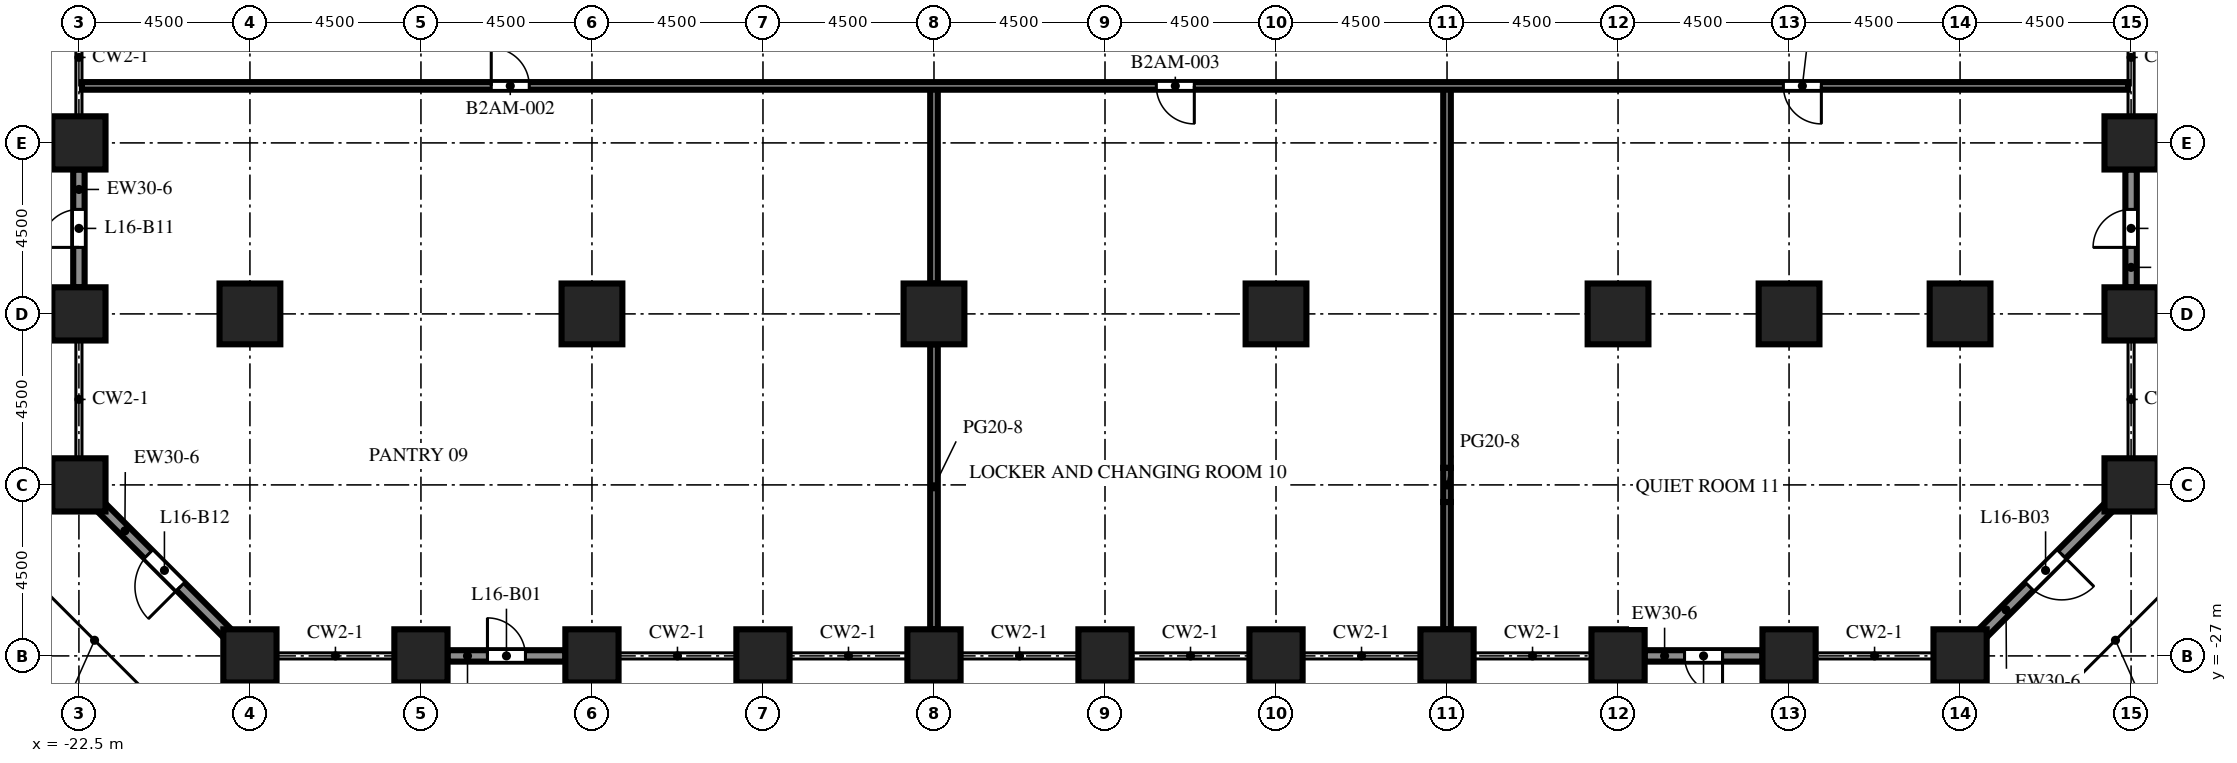
"""IFC4 building model, lengths in metres.
Left out: names, types, materials, properties, quantities, classifications, styles, units other than length and angle.
Written with IfcOpenShell. Run it as: python <this file> out.ifc"""

import sys

from ifc_helpers import new_model, si_unit, direction, frame, frame_2d, origin, origin_2d, place, context, subcontext, project, spatial, rectangle, extrude, element, fill, save


model = new_model("IFC4")
c1 = context("Model", 3, precision=1e-05, world=origin(), true_north=direction((0.0, 1.0)))
c2 = subcontext(c1, "Body", "Model", "MODEL_VIEW")
j1 = project(units=[si_unit("LENGTHUNIT", "METRE"), si_unit("PLANEANGLEUNIT", "RADIAN")], contexts=[c1])
p1 = place(None, origin())
s1 = spatial("IfcSite", under=j1, at=p1, CompositionType="ELEMENT")
p2 = place(p1, origin())
s2 = spatial("IfcBuilding", under=s1, at=p2, CompositionType="ELEMENT")
p3 = place(p2, frame((0.0, 0.0, 70.6)))
s3 = spatial("IfcBuildingStorey", under=s2, at=p3, CompositionType="ELEMENT", Elevation=70.6)
p4 = place(p3, frame((-22.5, -22.5, 0.0), z_axis=(0.0, 0.0, 1.0), x_axis=(1.0, 0.0, 0.0)))
e1 = element("IfcColumn", 1, at=p4, inside=s3, PredefinedType="COLUMN", context=c2, shape_type="SweptSolid", body=[
    extrude(rectangle(XDim=1.4, YDim=1.4, at=origin_2d()), origin(), (0.0, 0.0, 1.0), 3.6),
])
for number, where, z_axis, x_axis in (
    (2, (-22.5, -18.0, 0.0), (0.0, 0.0, 1.0), (1.0, 0.0, 0.0)),
    (3, (-22.5, -13.5, 0.0), (0.0, 0.0, 1.0), (1.0, 0.0, 0.0)),
    (4, (-18.0, -27.0, 0.0), (0.0, 0.0, 1.0), (1.0, 0.0, 0.0)),
    (5, (-13.5, -27.0, 0.0), (0.0, 0.0, 1.0), (1.0, 0.0, 0.0)),
):
    element("IfcColumn", number, at=place(p3, frame(where, z_axis=z_axis, x_axis=x_axis)), inside=s3, PredefinedType="COLUMN", context=c2, shape_type="SweptSolid", body=[
        extrude(rectangle(XDim=1.4, YDim=1.4, at=origin_2d()), origin(), (0.0, 0.0, 1.0), 6.0),
    ])
p5 = place(p3, frame((-9.0, -27.0, 0.0), z_axis=(0.0, 0.0, 1.0), x_axis=(1.0, 0.0, 0.0)))
e6 = element("IfcColumn", 6, at=p5, inside=s3, PredefinedType="COLUMN", context=c2, shape_type="SweptSolid", body=[
    extrude(rectangle(XDim=1.4, YDim=1.4, at=origin_2d()), origin(), (0.0, 0.0, 1.0), 3.6),
])
p6 = place(p3, frame((-4.5, -27.0, 0.0), z_axis=(0.0, 0.0, 1.0), x_axis=(1.0, 0.0, 0.0)))
e7 = element("IfcColumn", 7, at=p6, inside=s3, PredefinedType="COLUMN", context=c2, shape_type="SweptSolid", body=[
    extrude(rectangle(XDim=1.4, YDim=1.4, at=origin_2d()), origin(), (0.0, 0.0, 1.0), 6.0),
])
p7 = place(p3, frame((0.0, -27.0, 0.0), z_axis=(0.0, 0.0, 1.0), x_axis=(1.0, 0.0, 0.0)))
e8 = element("IfcColumn", 8, at=p7, inside=s3, PredefinedType="COLUMN", context=c2, shape_type="SweptSolid", body=[
    extrude(rectangle(XDim=1.4, YDim=1.4, at=origin_2d()), origin(), (0.0, 0.0, 1.0), 3.6),
])
p8 = place(p3, frame((4.5, -27.0, 0.0), z_axis=(0.0, 0.0, 1.0), x_axis=(1.0, 0.0, 0.0)))
e9 = element("IfcColumn", 9, at=p8, inside=s3, PredefinedType="COLUMN", context=c2, shape_type="SweptSolid", body=[
    extrude(rectangle(XDim=1.4, YDim=1.4, at=origin_2d()), origin(), (0.0, 0.0, 1.0), 6.0),
])
p9 = place(p3, frame((9.0, -27.0, 0.0), z_axis=(0.0, 0.0, 1.0), x_axis=(1.0, 0.0, 0.0)))
e10 = element("IfcColumn", 10, at=p9, inside=s3, PredefinedType="COLUMN", context=c2, shape_type="SweptSolid", body=[
    extrude(rectangle(XDim=1.4, YDim=1.4, at=origin_2d()), origin(), (0.0, 0.0, 1.0), 3.6),
])
for number, where, z_axis, x_axis in (
    (11, (13.5, -27.0, 0.0), (0.0, 0.0, 1.0), (1.0, 0.0, 0.0)),
    (12, (18.0, -27.0, 0.0), (0.0, 0.0, 1.0), (1.0, 0.0, 0.0)),
):
    element("IfcColumn", number, at=place(p3, frame(where, z_axis=z_axis, x_axis=x_axis)), inside=s3, PredefinedType="COLUMN", context=c2, shape_type="SweptSolid", body=[
        extrude(rectangle(XDim=1.4, YDim=1.4, at=origin_2d()), origin(), (0.0, 0.0, 1.0), 6.0),
    ])
p10 = place(p3, frame((22.5, -27.0, 0.0), z_axis=(0.0, 0.0, 1.0), x_axis=(1.0, 0.0, 0.0)))
e13 = element("IfcColumn", 13, at=p10, inside=s3, PredefinedType="COLUMN", context=c2, shape_type="SweptSolid", body=[
    extrude(rectangle(XDim=1.4, YDim=1.4, at=origin_2d()), origin(), (0.0, 0.0, 1.0), 3.6),
])
p11 = place(p3, frame((27.0, -27.0, 0.0), z_axis=(0.0, 0.0, 1.0), x_axis=(1.0, 0.0, 0.0)))
e14 = element("IfcColumn", 14, at=p11, inside=s3, PredefinedType="COLUMN", context=c2, shape_type="SweptSolid", body=[
    extrude(rectangle(XDim=1.4, YDim=1.4, at=origin_2d()), origin(), (0.0, 0.0, 1.0), 6.0),
])
p12 = place(p3, frame((31.5, -22.5, 0.0), z_axis=(0.0, 0.0, 1.0), x_axis=(1.0, 0.0, 0.0)))
e15 = element("IfcColumn", 15, at=p12, inside=s3, PredefinedType="COLUMN", context=c2, shape_type="SweptSolid", body=[
    extrude(rectangle(XDim=1.4, YDim=1.4, at=origin_2d()), origin(), (0.0, 0.0, 1.0), 3.6),
])
for number, where, z_axis, x_axis in (
    (16, (31.5, -18.0, 0.0), (0.0, 0.0, 1.0), (1.0, 0.0, 0.0)),
    (17, (31.5, -13.5, 0.0), (0.0, 0.0, 1.0), (1.0, 0.0, 0.0)),
):
    element("IfcColumn", number, at=place(p3, frame(where, z_axis=z_axis, x_axis=x_axis)), inside=s3, PredefinedType="COLUMN", context=c2, shape_type="SweptSolid", body=[
        extrude(rectangle(XDim=1.4, YDim=1.4, at=origin_2d()), origin(), (0.0, 0.0, 1.0), 6.0),
    ])
p13 = place(p3, frame((-18.0, -18.0, 0.0), z_axis=(0.0, 0.0, 1.0), x_axis=(1.0, 0.0, 0.0)))
e18 = element("IfcColumn", 18, at=p13, inside=s3, PredefinedType="COLUMN", context=c2, shape_type="SweptSolid", body=[
    extrude(rectangle(XDim=1.6, YDim=1.6, at=origin_2d()), origin(), (0.0, 0.0, 1.0), 6.0),
])
for number, where, z_axis, x_axis in (
    (19, (-9.0, -18.0, 0.0), (0.0, 0.0, 1.0), (1.0, 0.0, 0.0)),
    (20, (0.0, -18.0, 0.0), (0.0, 0.0, 1.0), (1.0, 0.0, 0.0)),
    (21, (9.0, -18.0, 0.0), (0.0, 0.0, 1.0), (1.0, 0.0, 0.0)),
):
    element("IfcColumn", number, at=place(p3, frame(where, z_axis=z_axis, x_axis=x_axis)), inside=s3, PredefinedType="COLUMN", context=c2, shape_type="SweptSolid", body=[
        extrude(rectangle(XDim=1.6, YDim=1.6, at=origin_2d()), origin(), (0.0, 0.0, 1.0), 5.4),
    ])
p14 = place(p3, frame((18.0, -18.0, 0.0), z_axis=(0.0, 0.0, 1.0), x_axis=(1.0, 0.0, 0.0)))
e22 = element("IfcColumn", 22, at=p14, inside=s3, PredefinedType="COLUMN", context=c2, shape_type="SweptSolid", body=[
    extrude(rectangle(XDim=1.6, YDim=1.6, at=origin_2d()), origin(), (0.0, 0.0, 1.0), 6.0),
])
p15 = place(p3, frame((22.5, -18.0, 0.0), z_axis=(0.0, 0.0, 1.0), x_axis=(1.0, 0.0, 0.0)))
e23 = element("IfcColumn", 23, at=p15, inside=s3, PredefinedType="COLUMN", context=c2, shape_type="SweptSolid", body=[
    extrude(rectangle(XDim=1.6, YDim=1.6, at=origin_2d()), origin(), (0.0, 0.0, 1.0), 5.4),
])
p16 = place(p3, frame((27.0, -18.0, 0.0), z_axis=(0.0, 0.0, 1.0), x_axis=(1.0, 0.0, 0.0)))
e24 = element("IfcColumn", 24, at=p16, inside=s3, PredefinedType="COLUMN", context=c2, shape_type="SweptSolid", body=[
    extrude(rectangle(XDim=1.6, YDim=1.6, at=origin_2d()), origin(), (0.0, 0.0, 1.0), 6.0),
])
p17 = place(p3, frame((-9.7, -27.0, 0.0), z_axis=(0.0, 0.0, 1.0), x_axis=(-1.0, 0.0, 0.0)))
e25 = element("IfcWall", 25, at=p17, inside=s3, PredefinedType="SOLIDWALL", context=c2, shape_type="SweptSolid", body=[
    extrude(rectangle(XDim=3.1, YDim=0.3, at=frame_2d((1.55, 0.0))), origin(), (0.0, 0.0, 1.0), 4.5),
])
p18 = place(p17, frame((1.05, 0.0, 0.0)))
e26 = element("IfcOpeningElement", 26, at=p18, cuts=e25, PredefinedType="OPENING", context=c2, shape_type="SweptSolid", body=[
    extrude(rectangle(XDim=1.0, YDim=2.2, at=frame_2d((0.5, 1.1))), frame((0.0, 0.16, 0.0), z_axis=(0.0, -1.0, 0.0), x_axis=(1.0, 0.0, 0.0)), (0.0, 0.0, 1.0), 0.32),
])
p19 = place(p3, frame((21.8, -27.0, 0.0), z_axis=(0.0, 0.0, 1.0), x_axis=(-1.0, 0.0, 0.0)))
e27 = element("IfcWall", 27, at=p19, inside=s3, PredefinedType="SOLIDWALL", context=c2, shape_type="SweptSolid", body=[
    extrude(rectangle(XDim=3.1, YDim=0.3, at=frame_2d((1.55, 0.0))), origin(), (0.0, 0.0, 1.0), 4.5),
])
p20 = place(p19, frame((1.05, 0.0, 0.0)))
e28 = element("IfcOpeningElement", 28, at=p20, cuts=e27, PredefinedType="OPENING", context=c2, shape_type="SweptSolid", body=[
    extrude(rectangle(XDim=1.0, YDim=2.2, at=frame_2d((0.5, 1.1))), frame((0.0, 0.16, 0.0), z_axis=(0.0, -1.0, 0.0), x_axis=(1.0, 0.0, 0.0)), (0.0, 0.0, 1.0), 0.32),
])
p21 = place(p3, frame((30.906, -23.094, 0.0), z_axis=(0.0, 0.0, 1.0), x_axis=(-0.707106781187, -0.707106781187, 0.0)))
e29 = element("IfcWall", 29, at=p21, inside=s3, PredefinedType="SOLIDWALL", context=c2, shape_type="SweptSolid", body=[
    extrude(rectangle(XDim=4.684, YDim=0.3, at=frame_2d((2.342, 0.0))), origin(), (0.0, 0.0, 1.0), 4.5),
])
p22 = place(p21, frame((1.742, 0.0, 0.0)))
e30 = element("IfcOpeningElement", 30, at=p22, cuts=e29, PredefinedType="OPENING", context=c2, shape_type="SweptSolid", body=[
    extrude(rectangle(XDim=1.2, YDim=2.2, at=frame_2d((0.6, 1.1))), frame((0.0, 0.16, 0.0), z_axis=(0.0, -1.0, 0.0), x_axis=(1.0, 0.0, 0.0)), (0.0, 0.0, 1.0), 0.32),
])
p23 = place(p3, frame((31.5, -14.2, 0.0), z_axis=(0.0, 0.0, 1.0), x_axis=(0.0, -1.0, 0.0)))
e31 = element("IfcWall", 31, at=p23, inside=s3, PredefinedType="SOLIDWALL", context=c2, shape_type="SweptSolid", body=[
    extrude(rectangle(XDim=3.1, YDim=0.3, at=frame_2d((1.55, 0.0))), origin(), (0.0, 0.0, 1.0), 4.5),
])
p24 = place(p23, frame((1.05, 0.0, 0.0)))
e32 = element("IfcOpeningElement", 32, at=p24, cuts=e31, PredefinedType="OPENING", context=c2, shape_type="SweptSolid", body=[
    extrude(rectangle(XDim=1.0, YDim=2.2, at=frame_2d((0.5, 1.1))), frame((0.0, 0.16, 0.0), z_axis=(0.0, -1.0, 0.0), x_axis=(1.0, 0.0, 0.0)), (0.0, 0.0, 1.0), 0.32),
])
p25 = place(p3, frame((-22.5, -17.3, 0.0), z_axis=(0.0, 0.0, 1.0), x_axis=(0.0, 1.0, 0.0)))
e33 = element("IfcWall", 33, at=p25, inside=s3, PredefinedType="SOLIDWALL", context=c2, shape_type="SweptSolid", body=[
    extrude(rectangle(XDim=3.1, YDim=0.3, at=frame_2d((1.55, 0.0))), origin(), (0.0, 0.0, 1.0), 4.5),
])
p26 = place(p25, frame((1.05, 0.0, 0.0)))
e34 = element("IfcOpeningElement", 34, at=p26, cuts=e33, PredefinedType="OPENING", context=c2, shape_type="SweptSolid", body=[
    extrude(rectangle(XDim=1.0, YDim=2.2, at=frame_2d((0.5, 1.1))), frame((0.0, 0.16, 0.0), z_axis=(0.0, -1.0, 0.0), x_axis=(1.0, 0.0, 0.0)), (0.0, 0.0, 1.0), 0.32),
])
p27 = place(p3, frame((-18.594, -26.406, 0.0), z_axis=(0.0, 0.0, 1.0), x_axis=(-0.707106781187, 0.707106781187, 0.0)))
e35 = element("IfcWall", 35, at=p27, inside=s3, PredefinedType="SOLIDWALL", context=c2, shape_type="SweptSolid", body=[
    extrude(rectangle(XDim=4.684, YDim=0.3, at=frame_2d((2.342, 0.0))), origin(), (0.0, 0.0, 1.0), 4.5),
])
p28 = place(p27, frame((1.742, 0.0, 0.0)))
e36 = element("IfcOpeningElement", 36, at=p28, cuts=e35, PredefinedType="OPENING", context=c2, shape_type="SweptSolid", body=[
    extrude(rectangle(XDim=1.2, YDim=2.2, at=frame_2d((0.6, 1.1))), frame((0.0, 0.16, 0.0), z_axis=(0.0, -1.0, 0.0), x_axis=(1.0, 0.0, 0.0)), (0.0, 0.0, 1.0), 0.32),
])
p29 = place(p3, frame((0.0, -26.3, 0.0), z_axis=(0.0, 0.0, 1.0), x_axis=(0.0, 1.0, 0.0)))
e37 = element("IfcWall", 37, at=p29, inside=s3, PredefinedType="PARTITIONING", context=c2, shape_type="SweptSolid", body=[
    extrude(rectangle(XDim=7.5, YDim=0.2, at=frame_2d((3.75, 0.0))), origin(), (0.0, 0.0, 1.0), 3.57),
])
p30 = place(p3, frame((0.0, -17.2, 0.0), z_axis=(0.0, 0.0, 1.0), x_axis=(0.0, 1.0, 0.0)))
e38 = element("IfcWall", 38, at=p30, inside=s3, PredefinedType="PARTITIONING", context=c2, shape_type="SweptSolid", body=[
    extrude(rectangle(XDim=5.2, YDim=0.2, at=frame_2d((2.6, 0.0))), origin(), (0.0, 0.0, 1.0), 5.4),
])
p31 = place(p3, frame((13.5, -26.3, 0.0), z_axis=(0.0, 0.0, 1.0), x_axis=(0.0, 1.0, 0.0)))
e39 = element("IfcWall", 39, at=p31, inside=s3, PredefinedType="PARTITIONING", context=c2, shape_type="SweptSolid", body=[
    extrude(rectangle(XDim=3.35, YDim=0.2, at=frame_2d((1.675, 0.0))), origin(), (0.0, 0.0, 1.0), 5.4),
])
p32 = place(p3, frame((13.5, -22.95, 0.0), z_axis=(0.0, 0.0, 1.0), x_axis=(0.0, 1.0, 0.0)))
e40 = element("IfcWall", 40, at=p32, inside=s3, PredefinedType="PARTITIONING", context=c2, shape_type="SweptSolid", body=[
    extrude(rectangle(XDim=0.9, YDim=0.2, at=frame_2d((0.45, 0.0))), origin(), (0.0, 0.0, 1.0), 3.57),
])
p33 = place(p3, frame((13.5, -22.05, 0.0), z_axis=(0.0, 0.0, 1.0), x_axis=(0.0, 1.0, 0.0)))
e41 = element("IfcWall", 41, at=p33, inside=s3, PredefinedType="PARTITIONING", context=c2, shape_type="SweptSolid", body=[
    extrude(rectangle(XDim=10.05, YDim=0.2, at=frame_2d((5.025, 0.0))), origin(), (0.0, 0.0, 1.0), 5.4),
])
p34 = place(p3, frame((31.42, -12.0, 0.0), z_axis=(0.0, 0.0, 1.0), x_axis=(-1.0, 0.0, 0.0)))
e42 = element("IfcWall", 42, at=p34, inside=s3, PredefinedType="PARTITIONING", context=c2, shape_type="SweptSolid", body=[
    extrude(rectangle(XDim=53.84, YDim=0.2, at=frame_2d((26.92, 0.0))), origin(), (0.0, 0.0, 1.0), 5.4),
])
p35 = place(p34, frame((42.07, 0.0, 0.0)))
e43 = element("IfcOpeningElement", 43, at=p35, cuts=e42, PredefinedType="OPENING", context=c2, shape_type="SweptSolid", body=[
    extrude(rectangle(XDim=1.0, YDim=2.1, at=frame_2d((0.5, 1.05))), frame((0.0, 0.11, 0.0), z_axis=(0.0, -1.0, 0.0), x_axis=(1.0, 0.0, 0.0)), (0.0, 0.0, 1.0), 0.22),
])
p36 = place(p34, frame((24.57, 0.0, 0.0)))
e44 = element("IfcOpeningElement", 44, at=p36, cuts=e42, PredefinedType="OPENING", context=c2, shape_type="SweptSolid", body=[
    extrude(rectangle(XDim=1.0, YDim=2.1, at=frame_2d((0.5, 1.05))), frame((0.0, 0.11, 0.0), z_axis=(0.0, -1.0, 0.0), x_axis=(1.0, 0.0, 0.0)), (0.0, 0.0, 1.0), 0.22),
])
p37 = place(p34, frame((8.07, 0.0, 0.0)))
e45 = element("IfcOpeningElement", 45, at=p37, cuts=e42, PredefinedType="OPENING", context=c2, shape_type="SweptSolid", body=[
    extrude(rectangle(XDim=1.0, YDim=2.1, at=frame_2d((0.5, 1.05))), frame((0.0, 0.11, 0.0), z_axis=(0.0, -1.0, 0.0), x_axis=(1.0, 0.0, 0.0)), (0.0, 0.0, 1.0), 0.22),
])
p38 = place(p18, origin())
e46 = element("IfcDoor", 46, at=p38, inside=s3, OperationType="SINGLE_SWING_RIGHT", PredefinedType="DOOR", context=c2, shape_type="SweptSolid", body=[
    extrude(rectangle(XDim=1.0, YDim=2.2, at=frame_2d((0.5, 1.1))), frame((0.0, 0.025, 0.0), z_axis=(0.0, -1.0, 0.0), x_axis=(1.0, 0.0, 0.0)), (0.0, 0.0, 1.0), 0.05),
])
fill(e26, e46)
p39 = place(p20, origin())
e47 = element("IfcDoor", 47, at=p39, inside=s3, OperationType="SINGLE_SWING_LEFT", PredefinedType="DOOR", context=c2, shape_type="SweptSolid", body=[
    extrude(rectangle(XDim=1.0, YDim=2.2, at=frame_2d((0.5, 1.1))), frame((0.0, 0.025, 0.0), z_axis=(0.0, -1.0, 0.0), x_axis=(1.0, 0.0, 0.0)), (0.0, 0.0, 1.0), 0.05),
])
fill(e28, e47)
p40 = place(p22, origin())
e48 = element("IfcDoor", 48, at=p40, inside=s3, OperationType="SINGLE_SWING_LEFT", PredefinedType="DOOR", context=c2, shape_type="SweptSolid", body=[
    extrude(rectangle(XDim=1.2, YDim=2.2, at=frame_2d((0.6, 1.1))), frame((0.0, 0.025, 0.0), z_axis=(0.0, -1.0, 0.0), x_axis=(1.0, 0.0, 0.0)), (0.0, 0.0, 1.0), 0.05),
])
fill(e30, e48)
p41 = place(p24, origin())
e49 = element("IfcDoor", 49, at=p41, inside=s3, OperationType="SINGLE_SWING_RIGHT", PredefinedType="DOOR", context=c2, shape_type="SweptSolid", body=[
    extrude(rectangle(XDim=1.0, YDim=2.2, at=frame_2d((0.5, 1.1))), frame((0.0, 0.025, 0.0), z_axis=(0.0, -1.0, 0.0), x_axis=(1.0, 0.0, 0.0)), (0.0, 0.0, 1.0), 0.05),
])
fill(e32, e49)
p42 = place(p26, origin())
e50 = element("IfcDoor", 50, at=p42, inside=s3, OperationType="SINGLE_SWING_LEFT", PredefinedType="DOOR", context=c2, shape_type="SweptSolid", body=[
    extrude(rectangle(XDim=1.0, YDim=2.2, at=frame_2d((0.5, 1.1))), frame((0.0, 0.025, 0.0), z_axis=(0.0, -1.0, 0.0), x_axis=(1.0, 0.0, 0.0)), (0.0, 0.0, 1.0), 0.05),
])
fill(e34, e50)
p43 = place(p28, origin())
e51 = element("IfcDoor", 51, at=p43, inside=s3, OperationType="SINGLE_SWING_LEFT", PredefinedType="DOOR", context=c2, shape_type="SweptSolid", body=[
    extrude(rectangle(XDim=1.2, YDim=2.2, at=frame_2d((0.6, 1.1))), frame((0.0, 0.025, 0.0), z_axis=(0.0, -1.0, 0.0), x_axis=(1.0, 0.0, 0.0)), (0.0, 0.0, 1.0), 0.05),
])
fill(e36, e51)
p44 = place(p35, origin())
e52 = element("IfcDoor", 52, at=p44, inside=s3, OperationType="SINGLE_SWING_RIGHT", PredefinedType="DOOR", context=c2, shape_type="SweptSolid", body=[
    extrude(rectangle(XDim=1.0, YDim=2.1, at=frame_2d((0.5, 1.05))), frame((0.0, 0.025, 0.0), z_axis=(0.0, -1.0, 0.0), x_axis=(1.0, 0.0, 0.0)), (0.0, 0.0, 1.0), 0.05),
])
fill(e43, e52)
p45 = place(p36, origin())
e53 = element("IfcDoor", 53, at=p45, inside=s3, OperationType="SINGLE_SWING_LEFT", PredefinedType="DOOR", context=c2, shape_type="SweptSolid", body=[
    extrude(rectangle(XDim=1.0, YDim=2.1, at=frame_2d((0.5, 1.05))), frame((0.0, 0.025, 0.0), z_axis=(0.0, -1.0, 0.0), x_axis=(1.0, 0.0, 0.0)), (0.0, 0.0, 1.0), 0.05),
])
fill(e44, e53)
p46 = place(p37, origin())
e54 = element("IfcDoor", 54, at=p46, inside=s3, OperationType="SINGLE_SWING_LEFT", PredefinedType="DOOR", context=c2, shape_type="SweptSolid", body=[
    extrude(rectangle(XDim=1.0, YDim=2.1, at=frame_2d((0.5, 1.05))), frame((0.0, 0.025, 0.0), z_axis=(0.0, -1.0, 0.0), x_axis=(1.0, 0.0, 0.0)), (0.0, 0.0, 1.0), 0.05),
])
fill(e45, e54)
save(model, sys.argv[1])
